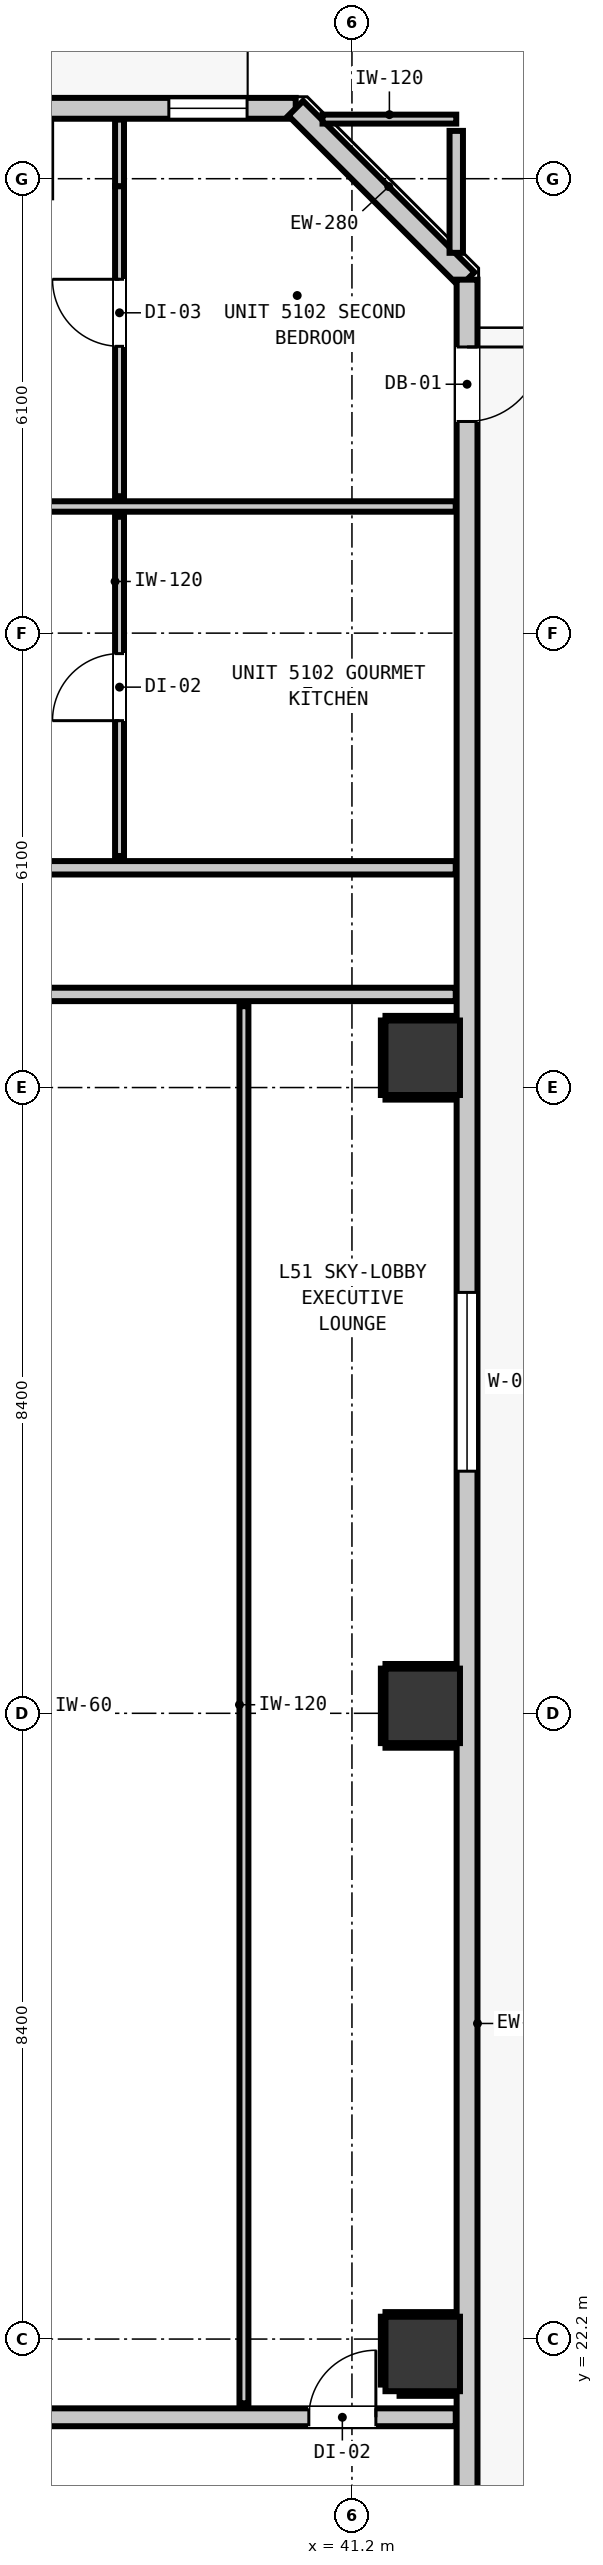
"""IFC4 building model, lengths in metres.
Left out: names, types, materials, properties, quantities, classifications, styles, units other than length and angle.
Written with IfcOpenShell. Run it as: python <this file> out.ifc"""

import sys

from ifc_helpers import new_model, si_unit, direction, frame, frame_2d, origin, origin_2d, place, context, subcontext, project, spatial, rectangle, extrude, element, fill, save


model = new_model("IFC4")
c1 = context("Model", 3, precision=1e-05, world=origin(), true_north=direction((0.0, 1.0)))
c2 = subcontext(c1, "Body", "Model", "MODEL_VIEW")
j1 = project(units=[si_unit("LENGTHUNIT", "METRE"), si_unit("PLANEANGLEUNIT", "RADIAN")], contexts=[c1])
p1 = place(None, origin())
s1 = spatial("IfcSite", under=j1, at=p1, CompositionType="ELEMENT")
p2 = place(p1, origin())
s2 = spatial("IfcBuilding", under=s1, at=p2, CompositionType="ELEMENT")
p3 = place(p2, frame((0.0, 0.0, 176.88)))
s3 = spatial("IfcBuildingStorey", under=s2, at=p3, CompositionType="ELEMENT", Elevation=176.88)
for number, where, z_axis, x_axis in (
    (1, (42.15, 22.0, 0.0), (0.0, 0.0, 1.0), (1.0, 0.0, 0.0)),
    (2, (42.15, 30.7, 0.0), (0.0, 0.0, 1.0), (1.0, 0.0, 0.0)),
    (3, (42.15, 39.4, 0.0), (0.0, 0.0, 1.0), (1.0, 0.0, 0.0)),
):
    element("IfcColumn", number, at=place(p3, frame(where, z_axis=z_axis, x_axis=x_axis)), inside=s3, PredefinedType="COLUMN", context=c2, shape_type="SweptSolid", body=[
        extrude(rectangle(XDim=1.0, YDim=1.0, at=origin_2d()), origin(), (0.0, 0.0, 1.0), 3.32),
    ])
p4 = place(p3, frame((5.355, 52.145, 0.0), z_axis=(0.0, 0.0, 1.0), x_axis=(1.0, 0.0, 0.0)))
e4 = element("IfcWall", 4, at=p4, inside=s3, PredefinedType="STANDARD", context=c2, shape_type="SweptSolid", body=[
    extrude(rectangle(XDim=35.09, YDim=0.28, at=frame_2d((17.545, 0.0))), origin(), (0.0, 0.0, 1.0), 3.08),
])
p5 = place(p4, frame((0.904, 0.0, 0.0)))
e5 = element("IfcOpeningElement", 5, at=p5, cuts=e4, PredefinedType="OPENING", context=c2, shape_type="SweptSolid", body=[
    extrude(rectangle(XDim=1.0, YDim=2.15, at=frame_2d((0.5, 1.075))), frame((0.0, 0.15, 0.0), z_axis=(0.0, -1.0, 0.0), x_axis=(1.0, 0.0, 0.0)), (0.0, 0.0, 1.0), 0.3),
])
p6 = place(p4, frame((3.817, 0.0, 0.85)))
e6 = element("IfcOpeningElement", 6, at=p6, cuts=e4, PredefinedType="OPENING", context=c2, shape_type="SweptSolid", body=[
    extrude(rectangle(XDim=2.4, YDim=1.95, at=frame_2d((1.2, 0.975))), frame((0.0, 0.15, 0.0), z_axis=(0.0, -1.0, 0.0), x_axis=(1.0, 0.0, 0.0)), (0.0, 0.0, 1.0), 0.3),
])
p7 = place(p4, frame((16.495, 0.0, 0.85)))
e7 = element("IfcOpeningElement", 7, at=p7, cuts=e4, PredefinedType="OPENING", context=c2, shape_type="SweptSolid", body=[
    extrude(rectangle(XDim=2.4, YDim=1.95, at=frame_2d((1.2, 0.975))), frame((0.0, 0.15, 0.0), z_axis=(0.0, -1.0, 0.0), x_axis=(1.0, 0.0, 0.0)), (0.0, 0.0, 1.0), 0.3),
])
p8 = place(p4, frame((26.295, 0.0, 0.85)))
e8 = element("IfcOpeningElement", 8, at=p8, cuts=e4, PredefinedType="OPENING", context=c2, shape_type="SweptSolid", body=[
    extrude(rectangle(XDim=2.4, YDim=1.95, at=frame_2d((1.2, 0.975))), frame((0.0, 0.15, 0.0), z_axis=(0.0, -1.0, 0.0), x_axis=(1.0, 0.0, 0.0)), (0.0, 0.0, 1.0), 0.3),
])
p9 = place(p4, frame((20.33, 0.0, 0.85)))
e9 = element("IfcOpeningElement", 9, at=p9, cuts=e4, PredefinedType="OPENING", context=c2, shape_type="SweptSolid", body=[
    extrude(rectangle(XDim=1.05, YDim=1.65, at=frame_2d((0.525, 0.825))), frame((0.0, 0.15, 0.0), z_axis=(0.0, -1.0, 0.0), x_axis=(1.0, 0.0, 0.0)), (0.0, 0.0, 1.0), 0.3),
])
p10 = place(p4, frame((33.387, 0.0, 0.85)))
e10 = element("IfcOpeningElement", 10, at=p10, cuts=e4, PredefinedType="OPENING", context=c2, shape_type="SweptSolid", body=[
    extrude(rectangle(XDim=1.05, YDim=1.65, at=frame_2d((0.525, 0.825))), frame((0.0, 0.15, 0.0), z_axis=(0.0, -1.0, 0.0), x_axis=(1.0, 0.0, 0.0)), (0.0, 0.0, 1.0), 0.3),
])
p11 = place(p3, frame((40.445, 52.145, 0.0), z_axis=(0.0, 0.0, 1.0), x_axis=(0.707106781187, -0.707106781187, 0.0)))
e11 = element("IfcWall", 11, at=p11, inside=s3, PredefinedType="STANDARD", context=c2, shape_type="SweptSolid", body=[
    extrude(rectangle(XDim=3.253, YDim=0.28, at=frame_2d((1.626, 0.0))), origin(), (0.0, 0.0, 1.0), 3.08),
])
p12 = place(p3, frame((42.745, 49.845, 0.0), z_axis=(0.0, 0.0, 1.0), x_axis=(0.0, -1.0, 0.0)))
e12 = element("IfcWall", 12, at=p12, inside=s3, PredefinedType="STANDARD", context=c2, shape_type="SweptSolid", body=[
    extrude(rectangle(XDim=32.29, YDim=0.28, at=frame_2d((16.145, 0.0))), origin(), (0.0, 0.0, 1.0), 3.08),
])
p13 = place(p12, frame((0.904, 0.0, 0.0)))
e13 = element("IfcOpeningElement", 13, at=p13, cuts=e12, PredefinedType="OPENING", context=c2, shape_type="SweptSolid", body=[
    extrude(rectangle(XDim=1.0, YDim=2.15, at=frame_2d((0.5, 1.075))), frame((0.0, 0.15, 0.0), z_axis=(0.0, -1.0, 0.0), x_axis=(1.0, 0.0, 0.0)), (0.0, 0.0, 1.0), 0.3),
])
p14 = place(p12, frame((30.822, 0.0, 0.85)))
e14 = element("IfcOpeningElement", 14, at=p14, cuts=e12, PredefinedType="OPENING", context=c2, shape_type="SweptSolid", body=[
    extrude(rectangle(XDim=1.05, YDim=1.65, at=frame_2d((0.525, 0.825))), frame((0.0, 0.15, 0.0), z_axis=(0.0, -1.0, 0.0), x_axis=(1.0, 0.0, 0.0)), (0.0, 0.0, 1.0), 0.3),
])
p15 = place(p12, frame((13.595, 0.0, 0.85)))
e15 = element("IfcOpeningElement", 15, at=p15, cuts=e12, PredefinedType="OPENING", context=c2, shape_type="SweptSolid", body=[
    extrude(rectangle(XDim=2.4, YDim=1.95, at=frame_2d((1.2, 0.975))), frame((0.0, 0.15, 0.0), z_axis=(0.0, -1.0, 0.0), x_axis=(1.0, 0.0, 0.0)), (0.0, 0.0, 1.0), 0.3),
])
p16 = place(p3, frame((12.983, 21.15, 0.0), z_axis=(0.0, 0.0, 1.0), x_axis=(1.0, 0.0, 0.0)))
e16 = element("IfcWall", 16, at=p16, inside=s3, PredefinedType="PARTITIONING", context=c2, shape_type="SweptSolid", body=[
    extrude(rectangle(XDim=29.61, YDim=0.24, at=frame_2d((14.805, 0.0))), origin(), (0.0, 0.0, 1.0), 3.08),
])
p17 = place(p16, frame((5.227, 0.0, 0.0)))
e17 = element("IfcOpeningElement", 17, at=p17, cuts=e16, PredefinedType="OPENING", context=c2, shape_type="SweptSolid", body=[
    extrude(rectangle(XDim=1.1, YDim=2.15, at=frame_2d((0.55, 1.075))), frame((0.0, 0.13, 0.0), z_axis=(0.0, -1.0, 0.0), x_axis=(1.0, 0.0, 0.0)), (0.0, 0.0, 1.0), 0.26),
])
p18 = place(p16, frame((27.638, 0.0, 0.0)))
e18 = element("IfcOpeningElement", 18, at=p18, cuts=e16, PredefinedType="OPENING", context=c2, shape_type="SweptSolid", body=[
    extrude(rectangle(XDim=0.9, YDim=2.1, at=frame_2d((0.45, 1.05))), frame((0.0, 0.13, 0.0), z_axis=(0.0, -1.0, 0.0), x_axis=(1.0, 0.0, 0.0)), (0.0, 0.0, 1.0), 0.26),
])
p19 = place(p3, frame((3.207, 40.25, 0.0), z_axis=(0.0, 0.0, 1.0), x_axis=(1.0, 0.0, 0.0)))
e19 = element("IfcWall", 19, at=p19, inside=s3, PredefinedType="PARTITIONING", context=c2, shape_type="SweptSolid", body=[
    extrude(rectangle(XDim=39.386, YDim=0.18, at=frame_2d((19.693, 0.0))), origin(), (0.0, 0.0, 1.0), 3.08),
])
p20 = place(p19, frame((14.228, 0.0, 0.0)))
e20 = element("IfcOpeningElement", 20, at=p20, cuts=e19, PredefinedType="OPENING", context=c2, shape_type="SweptSolid", body=[
    extrude(rectangle(XDim=1.4, YDim=2.15, at=frame_2d((0.7, 1.075))), frame((0.0, 0.1, 0.0), z_axis=(0.0, -1.0, 0.0), x_axis=(1.0, 0.0, 0.0)), (0.0, 0.0, 1.0), 0.2),
])
p21 = place(p19, frame((7.243, 0.0, 0.0)))
e21 = element("IfcOpeningElement", 21, at=p21, cuts=e19, PredefinedType="OPENING", context=c2, shape_type="SweptSolid", body=[
    extrude(rectangle(XDim=1.4, YDim=2.15, at=frame_2d((0.7, 1.075))), frame((0.0, 0.1, 0.0), z_axis=(0.0, -1.0, 0.0), x_axis=(1.0, 0.0, 0.0)), (0.0, 0.0, 1.0), 0.2),
])
p22 = place(p19, frame((3.017, 0.0, 0.0)))
e22 = element("IfcOpeningElement", 22, at=p22, cuts=e19, PredefinedType="OPENING", context=c2, shape_type="SweptSolid", body=[
    extrude(rectangle(XDim=0.95, YDim=2.1, at=frame_2d((0.475, 1.05))), frame((0.0, 0.1, 0.0), z_axis=(0.0, -1.0, 0.0), x_axis=(1.0, 0.0, 0.0)), (0.0, 0.0, 1.0), 0.2),
])
p23 = place(p3, frame((3.207, 41.95, 0.0), z_axis=(0.0, 0.0, 1.0), x_axis=(1.0, 0.0, 0.0)))
e23 = element("IfcWall", 23, at=p23, inside=s3, PredefinedType="PARTITIONING", context=c2, shape_type="SweptSolid", body=[
    extrude(rectangle(XDim=39.386, YDim=0.18, at=frame_2d((19.693, 0.0))), origin(), (0.0, 0.0, 1.0), 3.08),
])
p24 = place(p23, frame((9.55, 0.0, 0.0)))
e24 = element("IfcOpeningElement", 24, at=p24, cuts=e23, PredefinedType="OPENING", context=c2, shape_type="SweptSolid", body=[
    extrude(rectangle(XDim=1.0, YDim=2.15, at=frame_2d((0.5, 1.075))), frame((0.0, 0.1, 0.0), z_axis=(0.0, -1.0, 0.0), x_axis=(1.0, 0.0, 0.0)), (0.0, 0.0, 1.0), 0.2),
])
p25 = place(p23, frame((29.143, 0.0, 0.0)))
e25 = element("IfcOpeningElement", 25, at=p25, cuts=e23, PredefinedType="OPENING", context=c2, shape_type="SweptSolid", body=[
    extrude(rectangle(XDim=1.0, YDim=2.15, at=frame_2d((0.5, 1.075))), frame((0.0, 0.1, 0.0), z_axis=(0.0, -1.0, 0.0), x_axis=(1.0, 0.0, 0.0)), (0.0, 0.0, 1.0), 0.2),
])
p26 = place(p3, frame((3.207, 46.8, 0.0), z_axis=(0.0, 0.0, 1.0), x_axis=(1.0, 0.0, 0.0)))
e26 = element("IfcWall", 26, at=p26, inside=s3, PredefinedType="PARTITIONING", context=c2, shape_type="SweptSolid", body=[
    extrude(rectangle(XDim=39.386, YDim=0.14, at=frame_2d((19.693, 0.0))), origin(), (0.0, 0.0, 1.0), 3.08),
])
p27 = place(p26, frame((9.6, 0.0, 0.0)))
e27 = element("IfcOpeningElement", 27, at=p27, cuts=e26, PredefinedType="OPENING", context=c2, shape_type="SweptSolid", body=[
    extrude(rectangle(XDim=0.9, YDim=2.1, at=frame_2d((0.45, 1.05))), frame((0.0, 0.08, 0.0), z_axis=(0.0, -1.0, 0.0), x_axis=(1.0, 0.0, 0.0)), (0.0, 0.0, 1.0), 0.16),
])
p28 = place(p26, frame((29.193, 0.0, 0.0)))
e28 = element("IfcOpeningElement", 28, at=p28, cuts=e26, PredefinedType="OPENING", context=c2, shape_type="SweptSolid", body=[
    extrude(rectangle(XDim=0.9, YDim=2.1, at=frame_2d((0.45, 1.05))), frame((0.0, 0.08, 0.0), z_axis=(0.0, -1.0, 0.0), x_axis=(1.0, 0.0, 0.0)), (0.0, 0.0, 1.0), 0.16),
])
p29 = place(p3, frame((40.805, 52.0, 0.0), z_axis=(0.0, 0.0, 1.0), x_axis=(1.0, 0.0, 0.0)))
e29 = element("IfcWall", 29, at=p29, inside=s3, PredefinedType="PARTITIONING", context=c2, shape_type="SweptSolid", body=[
    extrude(rectangle(XDim=1.795, YDim=0.12, at=frame_2d((0.897, 0.0))), origin(), (0.0, 0.0, 1.0), 3.08),
])
p30 = place(p3, frame((42.6, 50.205, 0.0), z_axis=(0.0, 0.0, 1.0), x_axis=(0.0, 1.0, 0.0)))
e30 = element("IfcWall", 30, at=p30, inside=s3, PredefinedType="PARTITIONING", context=c2, shape_type="SweptSolid", body=[
    extrude(rectangle(XDim=1.637, YDim=0.18, at=frame_2d((0.818, 0.0))), origin(), (0.0, 0.0, 1.0), 3.08),
])
p31 = place(p3, frame((38.08, 42.108, 0.0), z_axis=(0.0, 0.0, 1.0), x_axis=(0.0, 1.0, 0.0)))
e31 = element("IfcWall", 31, at=p31, inside=s3, PredefinedType="PARTITIONING", context=c2, shape_type="SweptSolid", body=[
    extrude(rectangle(XDim=4.554, YDim=0.12, at=frame_2d((2.277, 0.0))), origin(), (0.0, 0.0, 1.0), 3.08),
])
p32 = place(p31, frame((1.817, 0.0, 0.0)))
e32 = element("IfcOpeningElement", 32, at=p32, cuts=e31, PredefinedType="OPENING", context=c2, shape_type="SweptSolid", body=[
    extrude(rectangle(XDim=0.9, YDim=2.1, at=frame_2d((0.45, 1.05))), frame((0.0, 0.07, 0.0), z_axis=(0.0, -1.0, 0.0), x_axis=(1.0, 0.0, 0.0)), (0.0, 0.0, 1.0), 0.14),
])
p33 = place(p3, frame((38.08, 46.938, 0.0), z_axis=(0.0, 0.0, 1.0), x_axis=(0.0, 1.0, 0.0)))
e33 = element("IfcWall", 33, at=p33, inside=s3, PredefinedType="PARTITIONING", context=c2, shape_type="SweptSolid", body=[
    extrude(rectangle(XDim=4.162, YDim=0.12, at=frame_2d((2.081, 0.0))), origin(), (0.0, 0.0, 1.0), 2.565),
])
p34 = place(p33, frame((2.012, 0.0, 0.0)))
e34 = element("IfcOpeningElement", 34, at=p34, cuts=e33, PredefinedType="OPENING", context=c2, shape_type="SweptSolid", body=[
    extrude(rectangle(XDim=0.9, YDim=2.1, at=frame_2d((0.45, 1.05))), frame((0.0, 0.07, 0.0), z_axis=(0.0, -1.0, 0.0), x_axis=(1.0, 0.0, 0.0)), (0.0, 0.0, 1.0), 0.14),
])
p35 = place(p3, frame((38.08, 51.1, 0.0), z_axis=(0.0, 0.0, 1.0), x_axis=(0.0, 1.0, 0.0)))
e35 = element("IfcWall", 35, at=p35, inside=s3, PredefinedType="PARTITIONING", context=c2, shape_type="SweptSolid", body=[
    extrude(rectangle(XDim=0.893, YDim=0.12, at=frame_2d((0.446, 0.0))), origin(), (0.0, 0.0, 1.0), 3.08),
])
p36 = place(p3, frame((39.75, 21.338, 0.0), z_axis=(0.0, 0.0, 1.0), x_axis=(0.0, 1.0, 0.0)))
e36 = element("IfcWall", 36, at=p36, inside=s3, PredefinedType="PARTITIONING", context=c2, shape_type="SweptSolid", body=[
    extrude(rectangle(XDim=18.754, YDim=0.12, at=frame_2d((9.377, 0.0))), origin(), (0.0, 0.0, 1.0), 3.08),
])
p37 = place(p3, frame((41.839, 21.468, 0.0), z_axis=(0.0, 0.0, 1.0), x_axis=(1.0, 0.0, 0.0)))
e37 = element("IfcWall", 37, at=p37, inside=s3, PredefinedType="PARTITIONING", context=c2, shape_type="SweptSolid", body=[
    extrude(rectangle(XDim=0.751, YDim=0.06, at=frame_2d((0.375, 0.0))), origin(), (0.0, 0.0, 1.0), 1.45),
])
p38 = place(p3, frame((41.65, 22.532, 0.0), z_axis=(0.0, 0.0, 1.0), x_axis=(1.0, 0.0, 0.0)))
e38 = element("IfcWall", 38, at=p38, inside=s3, PredefinedType="PARTITIONING", context=c2, shape_type="SweptSolid", body=[
    extrude(rectangle(XDim=0.94, YDim=0.06, at=frame_2d((0.47, 0.0))), origin(), (0.0, 0.0, 1.0), 1.45),
])
p39 = place(p3, frame((41.618, 21.589, 0.0), z_axis=(0.0, 0.0, 1.0), x_axis=(0.0, 1.0, 0.0)))
e39 = element("IfcWall", 39, at=p39, inside=s3, PredefinedType="PARTITIONING", context=c2, shape_type="SweptSolid", body=[
    extrude(rectangle(XDim=0.911, YDim=0.06, at=frame_2d((0.456, 0.0))), origin(), (0.0, 0.0, 1.0), 1.45),
])
for number, where, z_axis, x_axis in (
    (40, (41.65, 30.168, 0.0), (0.0, 0.0, 1.0), (1.0, 0.0, 0.0)),
    (41, (41.65, 31.232, 0.0), (0.0, 0.0, 1.0), (1.0, 0.0, 0.0)),
):
    element("IfcWall", number, at=place(p3, frame(where, z_axis=z_axis, x_axis=x_axis)), inside=s3, PredefinedType="PARTITIONING", context=c2, shape_type="SweptSolid", body=[
        extrude(rectangle(XDim=0.94, YDim=0.06, at=frame_2d((0.47, 0.0))), origin(), (0.0, 0.0, 1.0), 1.45),
    ])
p40 = place(p3, frame((41.618, 30.2, 0.0), z_axis=(0.0, 0.0, 1.0), x_axis=(0.0, 1.0, 0.0)))
e42 = element("IfcWall", 42, at=p40, inside=s3, PredefinedType="PARTITIONING", context=c2, shape_type="SweptSolid", body=[
    extrude(rectangle(XDim=1.0, YDim=0.06, at=frame_2d((0.5, 0.0))), origin(), (0.0, 0.0, 1.0), 1.45),
])
for number, where, z_axis, x_axis in (
    (43, (41.65, 38.868, 0.0), (0.0, 0.0, 1.0), (1.0, 0.0, 0.0)),
    (44, (41.65, 39.932, 0.0), (0.0, 0.0, 1.0), (1.0, 0.0, 0.0)),
):
    element("IfcWall", number, at=place(p3, frame(where, z_axis=z_axis, x_axis=x_axis)), inside=s3, PredefinedType="PARTITIONING", context=c2, shape_type="SweptSolid", body=[
        extrude(rectangle(XDim=0.94, YDim=0.06, at=frame_2d((0.47, 0.0))), origin(), (0.0, 0.0, 1.0), 1.45),
    ])
p41 = place(p3, frame((41.618, 38.9, 0.0), z_axis=(0.0, 0.0, 1.0), x_axis=(0.0, 1.0, 0.0)))
e45 = element("IfcWall", 45, at=p41, inside=s3, PredefinedType="PARTITIONING", context=c2, shape_type="SweptSolid", body=[
    extrude(rectangle(XDim=1.0, YDim=0.06, at=frame_2d((0.5, 0.0))), origin(), (0.0, 0.0, 1.0), 1.45),
])
p42 = place(p13, origin())
e46 = element("IfcDoor", 46, at=p42, inside=s3, OperationType="SINGLE_SWING_LEFT", PredefinedType="DOOR", context=c2, shape_type="SweptSolid", body=[
    extrude(rectangle(XDim=1.0, YDim=2.15, at=frame_2d((0.5, 1.075))), frame((0.0, 0.025, 0.0), z_axis=(0.0, -1.0, 0.0), x_axis=(1.0, 0.0, 0.0)), (0.0, 0.0, 1.0), 0.05),
])
fill(e13, e46)
p43 = place(p10, origin())
e47 = element("IfcWindow", 47, at=p43, inside=s3, PartitioningType="SINGLE_PANEL", PredefinedType="WINDOW", context=c2, shape_type="SweptSolid", body=[
    extrude(rectangle(XDim=1.05, YDim=1.65, at=frame_2d((0.525, 0.825))), frame((0.0, 0.03, 0.0), z_axis=(0.0, -1.0, 0.0), x_axis=(1.0, 0.0, 0.0)), (0.0, 0.0, 1.0), 0.06),
])
fill(e10, e47)
p44 = place(p15, origin())
e48 = element("IfcWindow", 48, at=p44, inside=s3, PartitioningType="SINGLE_PANEL", PredefinedType="WINDOW", context=c2, shape_type="SweptSolid", body=[
    extrude(rectangle(XDim=2.4, YDim=1.95, at=frame_2d((1.2, 0.975))), frame((0.0, 0.03, 0.0), z_axis=(0.0, -1.0, 0.0), x_axis=(1.0, 0.0, 0.0)), (0.0, 0.0, 1.0), 0.06),
])
fill(e15, e48)
p45 = place(p18, origin())
e49 = element("IfcDoor", 49, at=p45, inside=s3, OperationType="SINGLE_SWING_RIGHT", PredefinedType="DOOR", context=c2, shape_type="SweptSolid", body=[
    extrude(rectangle(XDim=0.9, YDim=2.1, at=frame_2d((0.45, 1.05))), frame((0.0, 0.025, 0.0), z_axis=(0.0, -1.0, 0.0), x_axis=(1.0, 0.0, 0.0)), (0.0, 0.0, 1.0), 0.05),
])
fill(e18, e49)
p46 = place(p32, origin())
e50 = element("IfcDoor", 50, at=p46, inside=s3, OperationType="SINGLE_SWING_LEFT", PredefinedType="DOOR", context=c2, shape_type="SweptSolid", body=[
    extrude(rectangle(XDim=0.9, YDim=2.1, at=frame_2d((0.45, 1.05))), frame((0.0, 0.025, 0.0), z_axis=(0.0, -1.0, 0.0), x_axis=(1.0, 0.0, 0.0)), (0.0, 0.0, 1.0), 0.05),
])
fill(e32, e50)
p47 = place(p34, origin())
e51 = element("IfcDoor", 51, at=p47, inside=s3, OperationType="SINGLE_SWING_RIGHT", PredefinedType="DOOR", context=c2, shape_type="SweptSolid", body=[
    extrude(rectangle(XDim=0.9, YDim=2.1, at=frame_2d((0.45, 1.05))), frame((0.0, 0.025, 0.0), z_axis=(0.0, -1.0, 0.0), x_axis=(1.0, 0.0, 0.0)), (0.0, 0.0, 1.0), 0.05),
])
fill(e34, e51)
save(model, sys.argv[1])
